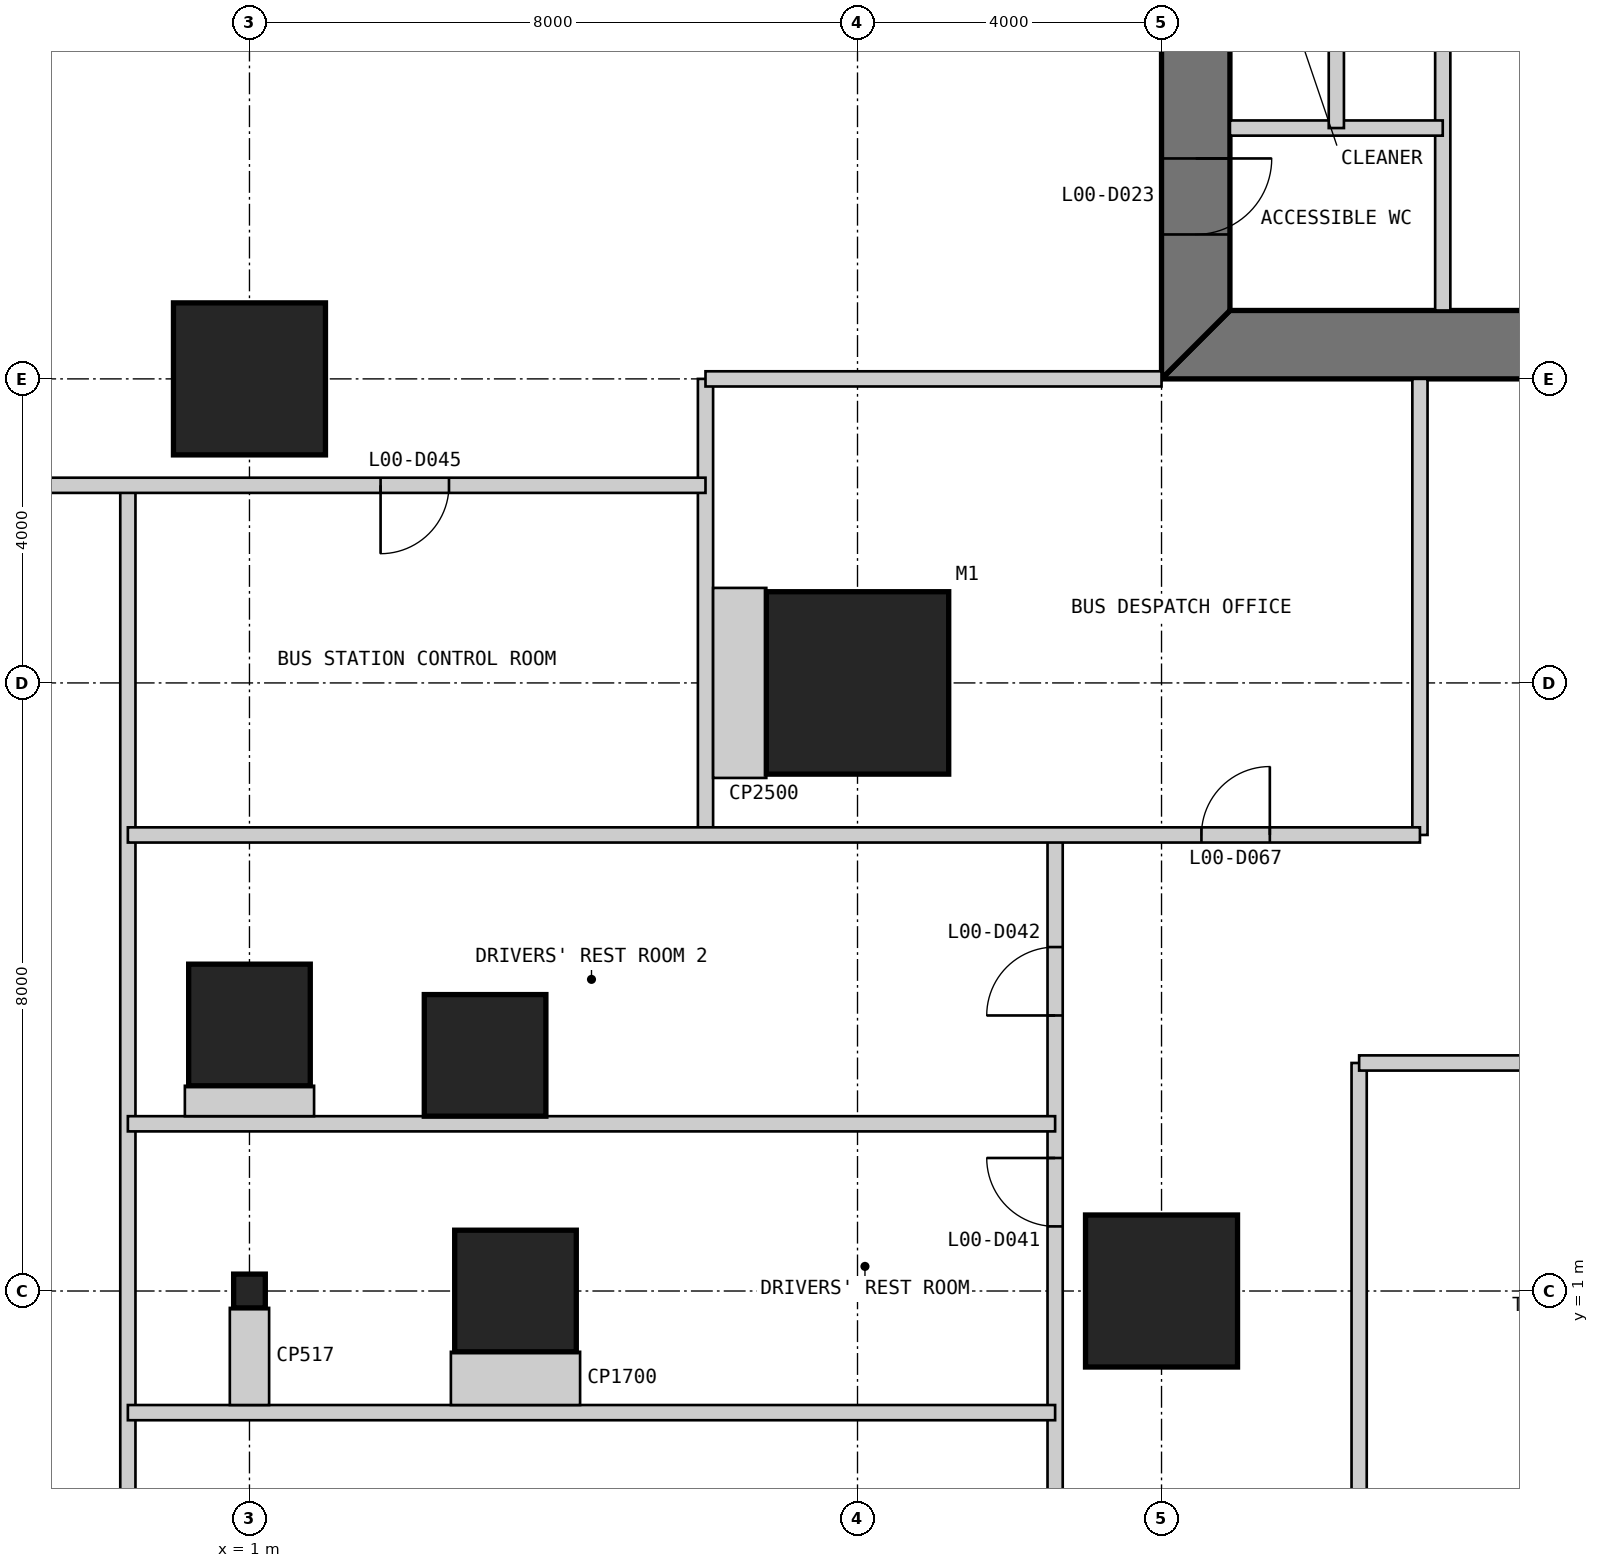
"""IFC4 building model, lengths in metres.
Left out: names, types, materials, properties, quantities, classifications, styles, units other than length and angle.
Written with IfcOpenShell. Run it as: python <this file> out.ifc"""

import sys

from ifc_helpers import new_model, si_unit, direction, frame, frame_2d, origin, origin_2d, place, context, subcontext, project, spatial, polyline, rectangle, i_section, outline, extrude, element, fill, save


model = new_model("IFC4")
c1 = context("Model", 3, precision=1e-05, world=origin(), true_north=direction((0.0, 1.0)))
c2 = subcontext(c1, "Body", "Model", "MODEL_VIEW")
j1 = project(units=[si_unit("LENGTHUNIT", "METRE"), si_unit("PLANEANGLEUNIT", "RADIAN")], contexts=[c1])
p1 = place(None, origin())
s1 = spatial("IfcSite", under=j1, at=p1, CompositionType="ELEMENT")
p2 = place(p1, origin())
s2 = spatial("IfcBuilding", under=s1, at=p2, CompositionType="ELEMENT")
p3 = place(p2, origin())
s3 = spatial("IfcBuildingStorey", under=s2, at=p3, CompositionType="ELEMENT", Elevation=0.0)
p4 = place(p3, frame((9.0, 9.0, 0.0), z_axis=(0.0, 0.0, 1.0), x_axis=(1.0, 0.0, 0.0)))
e1 = element("IfcColumn", 1, at=p4, inside=s3, PredefinedType="COLUMN", context=c2, shape_type="SweptSolid", body=[
    extrude(rectangle(XDim=2.4, YDim=2.4, at=origin_2d()), origin(), (0.0, 0.0, 1.0), 7.0),
])
p5 = place(p3, frame((4.5, 1.0, 0.0), z_axis=(0.0, 0.0, 1.0), x_axis=(1.0, 0.0, 0.0)))
e2 = element("IfcColumn", 2, at=p5, inside=s3, PredefinedType="COLUMN", context=c2, shape_type="SweptSolid", body=[
    extrude(rectangle(XDim=1.6, YDim=1.6, at=origin_2d()), origin(), (0.0, 0.0, 1.0), 7.0),
])
for number, where, z_axis, x_axis in (
    (3, (13.0, 1.0, 0.0), (0.0, 0.0, 1.0), (1.0, 0.0, 0.0)),
    (4, (1.0, 13.0, 0.0), (0.0, 0.0, 1.0), (1.0, 0.0, 0.0)),
):
    element("IfcColumn", number, at=place(p3, frame(where, z_axis=z_axis, x_axis=x_axis)), inside=s3, PredefinedType="COLUMN", context=c2, shape_type="SweptSolid", body=[
        extrude(rectangle(XDim=2.0, YDim=2.0, at=origin_2d()), origin(), (0.0, 0.0, 1.0), 7.0),
    ])
for number, where, z_axis, x_axis in (
    (5, (1.0, 4.5, 0.0), (0.0, 0.0, 1.0), (1.0, 0.0, 0.0)),
    (6, (4.1, 4.1, 0.0), (0.0, 0.0, 1.0), (1.0, 0.0, 0.0)),
):
    element("IfcColumn", number, at=place(p3, frame(where, z_axis=z_axis, x_axis=x_axis)), inside=s3, PredefinedType="COLUMN", context=c2, shape_type="SweptSolid", body=[
        extrude(rectangle(XDim=1.6, YDim=1.6, at=origin_2d()), origin(), (0.0, 0.0, 1.0), 7.0),
    ])
p6 = place(p3, frame((1.0, 1.0, 0.0), z_axis=(0.0, 0.0, 1.0), x_axis=(1.0, 0.0, 0.0)))
e7 = element("IfcColumn", 7, at=p6, inside=s3, PredefinedType="COLUMN", context=c2, shape_type="SweptSolid", body=[
    extrude(i_section(OverallWidth=0.417, OverallDepth=0.445, WebThickness=0.039, FlangeThickness=0.063, at=origin_2d()), origin(), (0.0, 0.0, 1.0), 7.0),
])
p7 = place(p3, frame((13.0, 13.45, 0.0), z_axis=(0.0, 0.0, 1.0), x_axis=(1.0, 0.0, 0.0)))
e8 = element("IfcWall", 8, at=p7, inside=s3, PredefinedType="SHEAR", context=c2, shape_type="SweptSolid", body=[
    extrude(outline(polyline([(0.0, -0.45), (24.0, -0.45), (23.1, 0.45), (0.9, 0.45), (0.0, -0.45)])), origin(), (0.0, 0.0, 1.0), 7.0),
])
p8 = place(p7, frame((4.9, 0.0, 0.0)))
e9 = element("IfcOpeningElement", 9, at=p8, cuts=e8, PredefinedType="OPENING", context=c2, shape_type="SweptSolid", body=[
    extrude(rectangle(XDim=1.0, YDim=2.2, at=frame_2d((0.5, 1.1))), frame((0.0, 0.46, 0.0), z_axis=(0.0, -1.0, 0.0), x_axis=(1.0, 0.0, 0.0)), (0.0, 0.0, 1.0), 0.92),
])
p9 = place(p7, frame((8.9, 0.0, 0.0)))
e10 = element("IfcOpeningElement", 10, at=p9, cuts=e8, PredefinedType="OPENING", context=c2, shape_type="SweptSolid", body=[
    extrude(rectangle(XDim=1.1, YDim=2.2, at=frame_2d((0.55, 1.1))), frame((0.0, 0.46, 0.0), z_axis=(0.0, -1.0, 0.0), x_axis=(1.0, 0.0, 0.0)), (0.0, 0.0, 1.0), 0.92),
])
p10 = place(p7, frame((15.05, 0.0, 0.0)))
e11 = element("IfcOpeningElement", 11, at=p10, cuts=e8, PredefinedType="OPENING", context=c2, shape_type="SweptSolid", body=[
    extrude(rectangle(XDim=0.9, YDim=2.2, at=frame_2d((0.45, 1.1))), frame((0.0, 0.46, 0.0), z_axis=(0.0, -1.0, 0.0), x_axis=(1.0, 0.0, 0.0)), (0.0, 0.0, 1.0), 0.92),
])
p11 = place(p7, frame((17.9, 0.0, 0.0)))
e12 = element("IfcOpeningElement", 12, at=p11, cuts=e8, PredefinedType="OPENING", context=c2, shape_type="SweptSolid", body=[
    extrude(rectangle(XDim=1.0, YDim=2.2, at=frame_2d((0.5, 1.1))), frame((0.0, 0.46, 0.0), z_axis=(0.0, -1.0, 0.0), x_axis=(1.0, 0.0, 0.0)), (0.0, 0.0, 1.0), 0.92),
])
p12 = place(p7, frame((21.4, 0.0, 0.0)))
e13 = element("IfcOpeningElement", 13, at=p12, cuts=e8, PredefinedType="OPENING", context=c2, shape_type="SweptSolid", body=[
    extrude(rectangle(XDim=1.0, YDim=2.2, at=frame_2d((0.5, 1.1))), frame((0.0, 0.46, 0.0), z_axis=(0.0, -1.0, 0.0), x_axis=(1.0, 0.0, 0.0)), (0.0, 0.0, 1.0), 0.92),
])
p13 = place(p3, frame((13.45, 36.1, 0.0), z_axis=(0.0, 0.0, 1.0), x_axis=(0.0, -1.0, 0.0)))
e14 = element("IfcWall", 14, at=p13, inside=s3, PredefinedType="SHEAR", context=c2, shape_type="SweptSolid", body=[
    extrude(outline(polyline([(-0.9, -0.45), (23.1, -0.45), (22.2, 0.45), (0.0, 0.45), (-0.9, -0.45)])), origin(), (0.0, 0.0, 1.0), 7.0),
])
p14 = place(p13, frame((20.2, 0.0, 0.0)))
e15 = element("IfcOpeningElement", 15, at=p14, cuts=e14, PredefinedType="OPENING", context=c2, shape_type="SweptSolid", body=[
    extrude(rectangle(XDim=1.0, YDim=2.2, at=frame_2d((0.5, 1.1))), frame((0.0, 0.46, 0.0), z_axis=(0.0, -1.0, 0.0), x_axis=(1.0, 0.0, 0.0)), (0.0, 0.0, 1.0), 0.92),
])
p15 = place(p13, frame((17.25, 0.0, 0.0)))
e16 = element("IfcOpeningElement", 16, at=p15, cuts=e14, PredefinedType="OPENING", context=c2, shape_type="SweptSolid", body=[
    extrude(rectangle(XDim=0.9, YDim=2.2, at=frame_2d((0.45, 1.1))), frame((0.0, 0.46, 0.0), z_axis=(0.0, -1.0, 0.0), x_axis=(1.0, 0.0, 0.0)), (0.0, 0.0, 1.0), 0.92),
])
p16 = place(p3, frame((16.7, 13.9, 0.0), z_axis=(0.0, 0.0, 1.0), x_axis=(0.0, 1.0, 0.0)))
e17 = element("IfcWall", 17, at=p16, inside=s3, PredefinedType="PARTITIONING", context=c2, shape_type="SweptSolid", body=[
    extrude(rectangle(XDim=16.1, YDim=0.2, at=frame_2d((8.05, 0.0))), origin(), (0.0, 0.0, 1.0), 6.8),
])
p17 = place(p16, frame((3.8, 0.0, 0.0)))
e18 = element("IfcOpeningElement", 18, at=p17, cuts=e17, PredefinedType="OPENING", context=c2, shape_type="SweptSolid", body=[
    extrude(rectangle(XDim=0.9, YDim=2.2, at=frame_2d((0.45, 1.1))), frame((0.0, 0.11, 0.0), z_axis=(0.0, -1.0, 0.0), x_axis=(1.0, 0.0, 0.0)), (0.0, 0.0, 1.0), 0.22),
])
p18 = place(p16, frame((7.217, 0.0, 0.0)))
e19 = element("IfcOpeningElement", 19, at=p18, cuts=e17, PredefinedType="OPENING", context=c2, shape_type="SweptSolid", body=[
    extrude(rectangle(XDim=1.1, YDim=2.2, at=frame_2d((0.55, 1.1))), frame((0.0, 0.11, 0.0), z_axis=(0.0, -1.0, 0.0), x_axis=(1.0, 0.0, 0.0)), (0.0, 0.0, 1.0), 0.22),
])
p19 = place(p16, frame((10.55, 0.0, 0.0)))
e20 = element("IfcOpeningElement", 20, at=p19, cuts=e17, PredefinedType="OPENING", context=c2, shape_type="SweptSolid", body=[
    extrude(rectangle(XDim=1.1, YDim=2.2, at=frame_2d((0.55, 1.1))), frame((0.0, 0.11, 0.0), z_axis=(0.0, -1.0, 0.0), x_axis=(1.0, 0.0, 0.0)), (0.0, 0.0, 1.0), 0.22),
])
p20 = place(p16, frame((13.883, 0.0, 0.0)))
e21 = element("IfcOpeningElement", 21, at=p20, cuts=e17, PredefinedType="OPENING", context=c2, shape_type="SweptSolid", body=[
    extrude(rectangle(XDim=1.1, YDim=2.2, at=frame_2d((0.55, 1.1))), frame((0.0, 0.11, 0.0), z_axis=(0.0, -1.0, 0.0), x_axis=(1.0, 0.0, 0.0)), (0.0, 0.0, 1.0), 0.22),
])
p21 = place(p3, frame((13.9, 16.3, 0.0), z_axis=(0.0, 0.0, 1.0), x_axis=(1.0, 0.0, 0.0)))
e22 = element("IfcWall", 22, at=p21, inside=s3, PredefinedType="PARTITIONING", context=c2, shape_type="SweptSolid", body=[
    extrude(rectangle(XDim=2.8, YDim=0.2, at=frame_2d((1.4, 0.0))), origin(), (0.0, 0.0, 1.0), 6.8),
])
p22 = place(p3, frame((15.3, 16.3, 0.0), z_axis=(0.0, 0.0, 1.0), x_axis=(0.0, 1.0, 0.0)))
e23 = element("IfcWall", 23, at=p22, inside=s3, PredefinedType="PARTITIONING", context=c2, shape_type="SweptSolid", body=[
    extrude(rectangle(XDim=3.7, YDim=0.2, at=frame_2d((1.85, 0.0))), origin(), (0.0, 0.0, 1.0), 6.8),
])
p23 = place(p3, frame((-0.6, -8.6, 0.0), z_axis=(0.0, 0.0, 1.0), x_axis=(0.0, 1.0, 0.0)))
e24 = element("IfcWall", 24, at=p23, inside=s3, PredefinedType="PARTITIONING", context=c2, shape_type="SweptSolid", body=[
    extrude(rectangle(XDim=20.2, YDim=0.2, at=frame_2d((10.1, 0.0))), origin(), (0.0, 0.0, 1.0), 6.7),
])
p24 = place(p3, frame((7.0, 7.0, 0.0), z_axis=(0.0, 0.0, 1.0), x_axis=(0.0, 1.0, 0.0)))
e25 = element("IfcWall", 25, at=p24, inside=s3, PredefinedType="PARTITIONING", context=c2, shape_type="SweptSolid", body=[
    extrude(rectangle(XDim=6.0, YDim=0.2, at=frame_2d((3.0, 0.0))), origin(), (0.0, 0.0, 1.0), 6.7),
])
p25 = place(p3, frame((11.6, -8.6, 0.0), z_axis=(0.0, 0.0, 1.0), x_axis=(0.0, 1.0, 0.0)))
e26 = element("IfcWall", 26, at=p25, inside=s3, PredefinedType="PARTITIONING", context=c2, shape_type="SweptSolid", body=[
    extrude(rectangle(XDim=15.6, YDim=0.2, at=frame_2d((7.8, 0.0))), origin(), (0.0, 0.0, 1.0), 6.7),
])
p26 = place(p25, frame((3.125, 0.0, 0.0)))
e27 = element("IfcOpeningElement", 27, at=p26, cuts=e26, PredefinedType="OPENING", context=c2, shape_type="SweptSolid", body=[
    extrude(rectangle(XDim=1.8, YDim=2.4, at=frame_2d((0.9, 1.2))), frame((0.0, 0.11, 0.0), z_axis=(0.0, -1.0, 0.0), x_axis=(1.0, 0.0, 0.0)), (0.0, 0.0, 1.0), 0.22),
])
p27 = place(p25, frame((10.45, 0.0, 0.0)))
e28 = element("IfcOpeningElement", 28, at=p27, cuts=e26, PredefinedType="OPENING", context=c2, shape_type="SweptSolid", body=[
    extrude(rectangle(XDim=0.9, YDim=2.2, at=frame_2d((0.45, 1.1))), frame((0.0, 0.11, 0.0), z_axis=(0.0, -1.0, 0.0), x_axis=(1.0, 0.0, 0.0)), (0.0, 0.0, 1.0), 0.22),
])
p28 = place(p25, frame((13.225, 0.0, 0.0)))
e29 = element("IfcOpeningElement", 29, at=p28, cuts=e26, PredefinedType="OPENING", context=c2, shape_type="SweptSolid", body=[
    extrude(rectangle(XDim=0.9, YDim=2.2, at=frame_2d((0.45, 1.1))), frame((0.0, 0.11, 0.0), z_axis=(0.0, -1.0, 0.0), x_axis=(1.0, 0.0, 0.0)), (0.0, 0.0, 1.0), 0.22),
])
p29 = place(p3, frame((15.6, -2.4, 0.0), z_axis=(0.0, 0.0, 1.0), x_axis=(0.0, 1.0, 0.0)))
e30 = element("IfcWall", 30, at=p29, inside=s3, PredefinedType="PARTITIONING", context=c2, shape_type="SweptSolid", body=[
    extrude(rectangle(XDim=6.4, YDim=0.2, at=frame_2d((3.2, 0.0))), origin(), (0.0, 0.0, 1.0), 6.7),
])
p30 = place(p3, frame((16.4, 7.0, 0.0), z_axis=(0.0, 0.0, 1.0), x_axis=(0.0, 1.0, 0.0)))
e31 = element("IfcWall", 31, at=p30, inside=s3, PredefinedType="PARTITIONING", context=c2, shape_type="SweptSolid", body=[
    extrude(rectangle(XDim=6.0, YDim=0.2, at=frame_2d((3.0, 0.0))), origin(), (0.0, 0.0, 1.0), 6.7),
])
for number, where, z_axis, x_axis in (
    (32, (-0.6, -0.6, 0.0), (0.0, 0.0, 1.0), (1.0, 0.0, 0.0)),
    (33, (-0.6, 3.2, 0.0), (0.0, 0.0, 1.0), (1.0, 0.0, 0.0)),
):
    element("IfcWall", number, at=place(p3, frame(where, z_axis=z_axis, x_axis=x_axis)), inside=s3, PredefinedType="PARTITIONING", context=c2, shape_type="SweptSolid", body=[
        extrude(rectangle(XDim=12.2, YDim=0.2, at=frame_2d((6.1, 0.0))), origin(), (0.0, 0.0, 1.0), 6.7),
    ])
p31 = place(p3, frame((15.6, 4.0, 0.0), z_axis=(0.0, 0.0, 1.0), x_axis=(1.0, 0.0, 0.0)))
e34 = element("IfcWall", 34, at=p31, inside=s3, PredefinedType="PARTITIONING", context=c2, shape_type="SweptSolid", body=[
    extrude(rectangle(XDim=8.0, YDim=0.2, at=frame_2d((4.0, 0.0))), origin(), (0.0, 0.0, 1.0), 6.7),
])
p32 = place(p31, frame((3.55, 0.0, 0.0)))
e35 = element("IfcOpeningElement", 35, at=p32, cuts=e34, PredefinedType="OPENING", context=c2, shape_type="SweptSolid", body=[
    extrude(rectangle(XDim=0.9, YDim=2.2, at=frame_2d((0.45, 1.1))), frame((0.0, 0.11, 0.0), z_axis=(0.0, -1.0, 0.0), x_axis=(1.0, 0.0, 0.0)), (0.0, 0.0, 1.0), 0.22),
])
p33 = place(p3, frame((-0.6, 7.0, 0.0), z_axis=(0.0, 0.0, 1.0), x_axis=(1.0, 0.0, 0.0)))
e36 = element("IfcWall", 36, at=p33, inside=s3, PredefinedType="PARTITIONING", context=c2, shape_type="SweptSolid", body=[
    extrude(rectangle(XDim=17.0, YDim=0.2, at=frame_2d((8.5, 0.0))), origin(), (0.0, 0.0, 1.0), 6.7),
])
p34 = place(p33, frame((14.125, 0.0, 0.0)))
e37 = element("IfcOpeningElement", 37, at=p34, cuts=e36, PredefinedType="OPENING", context=c2, shape_type="SweptSolid", body=[
    extrude(rectangle(XDim=0.9, YDim=2.2, at=frame_2d((0.45, 1.1))), frame((0.0, 0.11, 0.0), z_axis=(0.0, -1.0, 0.0), x_axis=(1.0, 0.0, 0.0)), (0.0, 0.0, 1.0), 0.22),
])
p35 = place(p3, frame((-15.25, 11.6, 0.0), z_axis=(0.0, 0.0, 1.0), x_axis=(1.0, 0.0, 0.0)))
e38 = element("IfcWall", 38, at=p35, inside=s3, PredefinedType="PARTITIONING", context=c2, shape_type="SweptSolid", body=[
    extrude(rectangle(XDim=22.25, YDim=0.2, at=frame_2d((11.125, 0.0))), origin(), (0.0, 0.0, 1.0), 6.7),
])
p36 = place(p35, frame((10.325, 0.0, 0.0)))
e39 = element("IfcOpeningElement", 39, at=p36, cuts=e38, PredefinedType="OPENING", context=c2, shape_type="SweptSolid", body=[
    extrude(rectangle(XDim=1.8, YDim=2.4, at=frame_2d((0.9, 1.2))), frame((0.0, 0.11, 0.0), z_axis=(0.0, -1.0, 0.0), x_axis=(1.0, 0.0, 0.0)), (0.0, 0.0, 1.0), 0.22),
])
p37 = place(p35, frame((3.025, 0.0, 0.0)))
e40 = element("IfcOpeningElement", 40, at=p37, cuts=e38, PredefinedType="OPENING", context=c2, shape_type="SweptSolid", body=[
    extrude(rectangle(XDim=1.8, YDim=2.4, at=frame_2d((0.9, 1.2))), frame((0.0, 0.11, 0.0), z_axis=(0.0, -1.0, 0.0), x_axis=(1.0, 0.0, 0.0)), (0.0, 0.0, 1.0), 0.22),
])
p38 = place(p35, frame((17.975, 0.0, 0.0)))
e41 = element("IfcOpeningElement", 41, at=p38, cuts=e38, PredefinedType="OPENING", context=c2, shape_type="SweptSolid", body=[
    extrude(rectangle(XDim=0.9, YDim=2.2, at=frame_2d((0.45, 1.1))), frame((0.0, 0.11, 0.0), z_axis=(0.0, -1.0, 0.0), x_axis=(1.0, 0.0, 0.0)), (0.0, 0.0, 1.0), 0.22),
])
p39 = place(p3, frame((7.0, 13.0, 0.0), z_axis=(0.0, 0.0, 1.0), x_axis=(1.0, 0.0, 0.0)))
e42 = element("IfcWall", 42, at=p39, inside=s3, PredefinedType="PARTITIONING", context=c2, shape_type="SweptSolid", body=[
    extrude(rectangle(XDim=6.0, YDim=0.2, at=frame_2d((3.0, 0.0))), origin(), (0.0, 0.0, 1.0), 5.853),
])
p40 = place(p3, frame((4.5, -0.5, 0.0), z_axis=(0.0, 0.0, 1.0), x_axis=(0.0, 1.0, 0.0)))
e43 = element("IfcWall", 43, at=p40, inside=s3, PredefinedType="PARTITIONING", context=c2, shape_type="SweptSolid", body=[
    extrude(rectangle(XDim=0.7, YDim=1.7, at=frame_2d((0.35, 0.0))), origin(), (0.0, 0.0, 1.0), 6.7),
])
p41 = place(p3, frame((1.0, -0.5, 0.0), z_axis=(0.0, 0.0, 1.0), x_axis=(0.0, 1.0, 0.0)))
e44 = element("IfcWall", 44, at=p41, inside=s3, PredefinedType="PARTITIONING", context=c2, shape_type="SweptSolid", body=[
    extrude(rectangle(XDim=1.278, YDim=0.517, at=frame_2d((0.639, 0.0))), origin(), (0.0, 0.0, 1.0), 5.954),
])
p42 = place(p3, frame((1.0, 3.3, 0.0), z_axis=(0.0, 0.0, 1.0), x_axis=(0.0, 1.0, 0.0)))
e45 = element("IfcWall", 45, at=p42, inside=s3, PredefinedType="PARTITIONING", context=c2, shape_type="SweptSolid", body=[
    extrude(rectangle(XDim=0.4, YDim=1.7, at=frame_2d((0.2, 0.0))), origin(), (0.0, 0.0, 1.0), 6.7),
])
p43 = place(p3, frame((7.1, 9.0, 0.0), z_axis=(0.0, 0.0, 1.0), x_axis=(1.0, 0.0, 0.0)))
e46 = element("IfcWall", 46, at=p43, inside=s3, PredefinedType="PARTITIONING", context=c2, shape_type="SweptSolid", body=[
    extrude(rectangle(XDim=0.7, YDim=2.5, at=frame_2d((0.35, 0.0))), origin(), (0.0, 0.0, 1.0), 6.7),
])
p44 = place(p14, origin())
e47 = element("IfcDoor", 47, at=p44, inside=s3, OperationType="SINGLE_SWING_LEFT", PredefinedType="DOOR", context=c2, shape_type="SweptSolid", body=[
    extrude(rectangle(XDim=1.0, YDim=2.2, at=frame_2d((0.5, 1.1))), frame((0.0, 0.025, 0.0), z_axis=(0.0, -1.0, 0.0), x_axis=(1.0, 0.0, 0.0)), (0.0, 0.0, 1.0), 0.05),
    extrude(outline(polyline([(0.0, 0.0), (0.04, 0.0), (0.04, 2.16), (0.96, 2.16), (0.96, 0.0), (1.0, 0.0), (1.0, 2.2), (0.0, 2.2), (0.0, 0.0)])), frame((0.0, 0.3, 0.0), z_axis=(0.0, -1.0, 0.0), x_axis=(1.0, 0.0, 0.0)), (0.0, 0.0, 1.0), 0.6),
])
fill(e15, e47)
p45 = place(p27, origin())
e48 = element("IfcDoor", 48, at=p45, inside=s3, OperationType="SINGLE_SWING_RIGHT", PredefinedType="DOOR", context=c2, shape_type="SweptSolid", body=[
    extrude(rectangle(XDim=0.9, YDim=2.2, at=frame_2d((0.45, 1.1))), frame((0.0, 0.025, 0.0), z_axis=(0.0, -1.0, 0.0), x_axis=(1.0, 0.0, 0.0)), (0.0, 0.0, 1.0), 0.05),
])
fill(e28, e48)
p46 = place(p28, origin())
e49 = element("IfcDoor", 49, at=p46, inside=s3, OperationType="SINGLE_SWING_LEFT", PredefinedType="DOOR", context=c2, shape_type="SweptSolid", body=[
    extrude(rectangle(XDim=0.9, YDim=2.2, at=frame_2d((0.45, 1.1))), frame((0.0, 0.025, 0.0), z_axis=(0.0, -1.0, 0.0), x_axis=(1.0, 0.0, 0.0)), (0.0, 0.0, 1.0), 0.05),
])
fill(e29, e49)
p47 = place(p38, frame((0.9, 0.0, 0.0), z_axis=(0.0, 0.0, 1.0), x_axis=(-1.0, 0.0, 0.0)))
e50 = element("IfcDoor", 50, at=p47, inside=s3, OperationType="SINGLE_SWING_RIGHT", PredefinedType="DOOR", context=c2, shape_type="SweptSolid", body=[
    extrude(rectangle(XDim=0.9, YDim=2.2, at=frame_2d((0.45, 1.1))), frame((0.0, 0.025, 0.0), z_axis=(0.0, -1.0, 0.0), x_axis=(1.0, 0.0, 0.0)), (0.0, 0.0, 1.0), 0.05),
])
fill(e41, e50)
p48 = place(p34, origin())
e51 = element("IfcDoor", 51, at=p48, inside=s3, OperationType="SINGLE_SWING_RIGHT", PredefinedType="DOOR", context=c2, shape_type="SweptSolid", body=[
    extrude(rectangle(XDim=0.9, YDim=2.2, at=frame_2d((0.45, 1.1))), frame((0.0, 0.025, 0.0), z_axis=(0.0, -1.0, 0.0), x_axis=(1.0, 0.0, 0.0)), (0.0, 0.0, 1.0), 0.05),
])
fill(e37, e51)
save(model, sys.argv[1])
